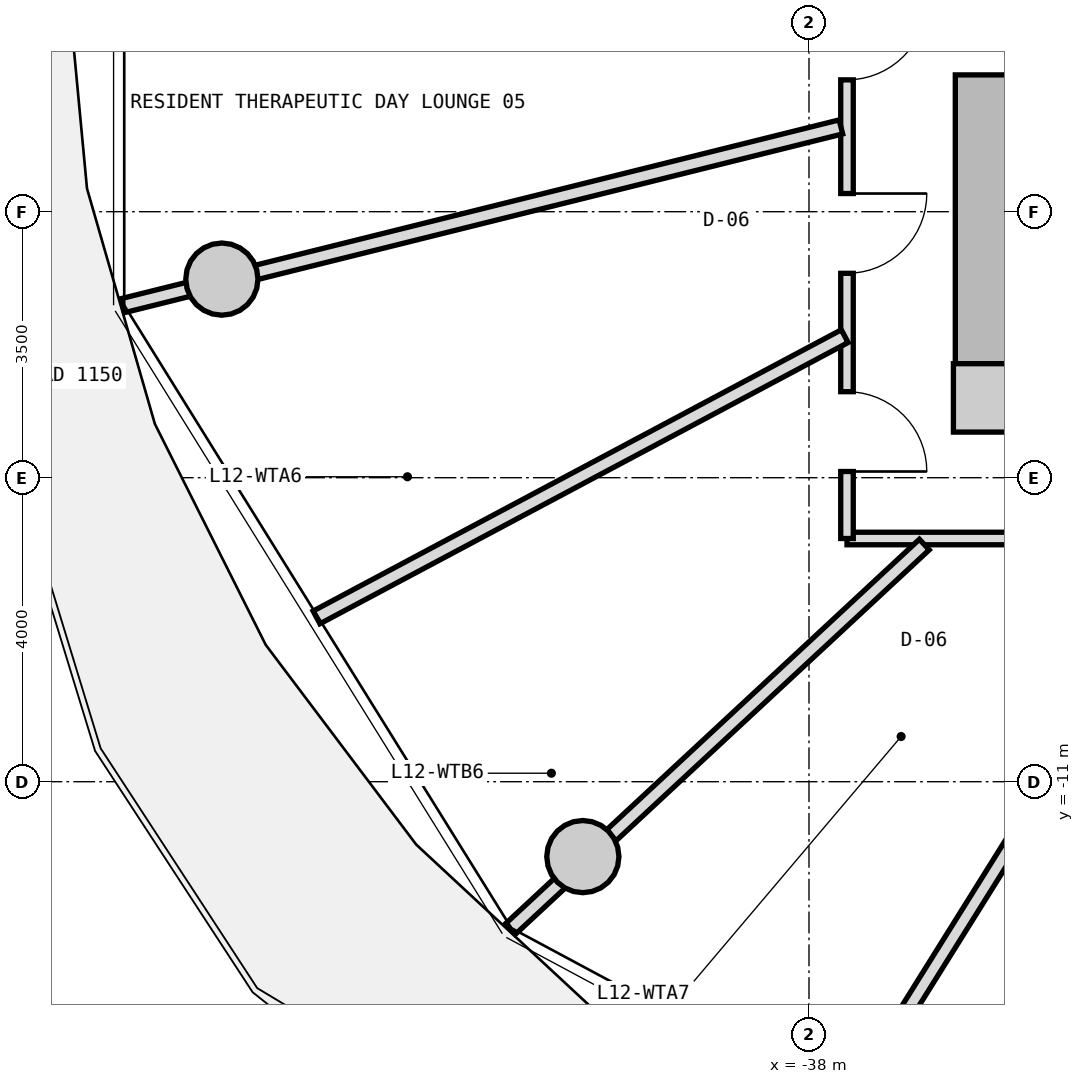
"""IFC4 building model, lengths in metres.
Left out: names, types, materials, properties, quantities, classifications, styles, units other than length and angle.
Written with IfcOpenShell. Run it as: python <this file> out.ifc"""

import sys

from ifc_helpers import new_model, si_unit, direction, frame, frame_2d, origin, origin_2d, place, context, subcontext, project, spatial, rectangle, circle, extrude, source, transform, mapped, element, fill, save


model = new_model("IFC4")
c1 = context("Model", 3, precision=1e-05, world=origin(), true_north=direction((0.0, 1.0)))
c2 = subcontext(c1, "Body", "Model", "MODEL_VIEW")
j1 = project(units=[si_unit("LENGTHUNIT", "METRE"), si_unit("PLANEANGLEUNIT", "RADIAN")], contexts=[c1])
p1 = place(None, origin())
s1 = spatial("IfcSite", under=j1, at=p1, CompositionType="ELEMENT")
p2 = place(p1, origin())
s2 = spatial("IfcBuilding", under=s1, at=p2, CompositionType="ELEMENT")
p3 = place(p2, frame((0.0, 0.0, 42.95)))
s3 = spatial("IfcBuildingStorey", under=s2, at=p3, CompositionType="ELEMENT", Elevation=42.95)
m1 = source(origin(), c2, "Body", "SweptSolid", [
    extrude(rectangle(XDim=0.9, YDim=0.9, at=origin_2d()), origin(), (0.0, 0.0, 1.0), 3.05),
])
p4 = place(p3, frame((-35.65, -5.95, 0.0), z_axis=(0.0, 0.0, 1.0), x_axis=(1.0, 0.0, 0.0)))
e1 = element("IfcColumn", 1, at=p4, inside=s3, PredefinedType="COLUMN", context=c2, shape_type="MappedRepresentation", body=[
    mapped(m1, transform((0.0, 0.0, 0.0), x_axis=(1.0, 0.0, 0.0), y_axis=(0.0, 1.0, 0.0), z_axis=(0.0, 0.0, 1.0), scale=1.0)),
])
m2 = source(origin(), c2, "Body", "SweptSolid", [
    extrude(rectangle(XDim=11.0, YDim=0.85, at=frame_2d((5.5, 0.0))), origin(), (0.0, 0.0, 1.0), 2.79),
])
p5 = place(p3, frame((-35.65, -5.5, 0.0), z_axis=(0.0, 0.0, 1.0), x_axis=(0.0, 1.0, 0.0)))
e2 = element("IfcWall", 2, at=p5, inside=s3, PredefinedType="SHEAR", context=c2, shape_type="MappedRepresentation", body=[
    mapped(m2, transform((0.0, 0.0, 0.0), x_axis=(1.0, 0.0, 0.0), y_axis=(0.0, 1.0, 0.0), z_axis=(0.0, 0.0, 1.0), scale=1.0)),
])
p6 = place(p5, frame((3.8, 0.0, 0.0)))
e3 = element("IfcOpeningElement", 3, at=p6, cuts=e2, PredefinedType="OPENING", context=c2, shape_type="SweptSolid", body=[
    extrude(rectangle(XDim=1.2, YDim=2.15, at=frame_2d((0.6, 1.075))), frame((0.0, 0.435, 0.0), z_axis=(0.0, -1.0, 0.0), x_axis=(1.0, 0.0, 0.0)), (0.0, 0.0, 1.0), 0.87),
])
m3 = source(origin(), c2, "Body", "SweptSolid", [
    extrude(circle(Radius=0.475, at=origin_2d()), origin(), (0.0, 0.0, 1.0), 3.05),
])
for number, where, z_axis, x_axis in (
    (4, (-45.725, -4.387, 0.0), (0.0, 0.0, 1.0), (1.0, 0.0, 0.0)),
    (5, (-40.975, -11.985, 0.0), (0.0, 0.0, 1.0), (1.0, 0.0, 0.0)),
):
    element("IfcColumn", number, at=place(p3, frame(where, z_axis=z_axis, x_axis=x_axis)), inside=s3, PredefinedType="COLUMN", context=c2, shape_type="MappedRepresentation", body=[
        mapped(m3, transform((0.0, 0.0, 0.0), x_axis=(1.0, 0.0, 0.0), y_axis=(0.0, 1.0, 0.0), z_axis=(0.0, 0.0, 1.0), scale=1.0)),
    ])
m4 = source(origin(), c2, "Body", "SweptSolid", [
    extrude(rectangle(XDim=19.0, YDim=0.165, at=frame_2d((9.5, 0.0))), origin(), (0.0, 0.0, 1.0), 2.775),
])
p7 = place(p3, frame((-18.5, -7.8, 0.0), z_axis=(0.0, 0.0, 1.0), x_axis=(-1.0, 0.0, 0.0)))
e6 = element("IfcWall", 6, at=p7, inside=s3, PredefinedType="PARTITIONING", context=c2, shape_type="MappedRepresentation", body=[
    mapped(m4, transform((0.0, 0.0, 0.0), x_axis=(1.0, 0.0, 0.0), y_axis=(0.0, 1.0, 0.0), z_axis=(0.0, 0.0, 1.0), scale=1.0)),
])
p8 = place(p7, frame((15.652, 0.0, 0.0)))
e7 = element("IfcOpeningElement", 7, at=p8, cuts=e6, PredefinedType="OPENING", context=c2, shape_type="SweptSolid", body=[
    extrude(rectangle(XDim=1.05, YDim=2.15, at=frame_2d((0.525, 1.075))), frame((0.0, 0.093, 0.0), z_axis=(0.0, -1.0, 0.0), x_axis=(1.0, 0.0, 0.0)), (0.0, 0.0, 1.0), 0.185),
])
p9 = place(p7, frame((12.5, 0.0, 0.0)))
e8 = element("IfcOpeningElement", 8, at=p9, cuts=e6, PredefinedType="OPENING", context=c2, shape_type="SweptSolid", body=[
    extrude(rectangle(XDim=1.05, YDim=2.15, at=frame_2d((0.525, 1.075))), frame((0.0, 0.093, 0.0), z_axis=(0.0, -1.0, 0.0), x_axis=(1.0, 0.0, 0.0)), (0.0, 0.0, 1.0), 0.185),
])
p10 = place(p7, frame((10.104, 0.0, 0.0)))
e9 = element("IfcOpeningElement", 9, at=p10, cuts=e6, PredefinedType="OPENING", context=c2, shape_type="SweptSolid", body=[
    extrude(rectangle(XDim=1.05, YDim=2.15, at=frame_2d((0.525, 1.075))), frame((0.0, 0.093, 0.0), z_axis=(0.0, -1.0, 0.0), x_axis=(1.0, 0.0, 0.0)), (0.0, 0.0, 1.0), 0.185),
])
p11 = place(p7, frame((7.806, 0.0, 0.0)))
e10 = element("IfcOpeningElement", 10, at=p11, cuts=e6, PredefinedType="OPENING", context=c2, shape_type="SweptSolid", body=[
    extrude(rectangle(XDim=1.05, YDim=2.15, at=frame_2d((0.525, 1.075))), frame((0.0, 0.093, 0.0), z_axis=(0.0, -1.0, 0.0), x_axis=(1.0, 0.0, 0.0)), (0.0, 0.0, 1.0), 0.185),
])
p12 = place(p7, frame((5.915, 0.0, 0.0)))
e11 = element("IfcOpeningElement", 11, at=p12, cuts=e6, PredefinedType="OPENING", context=c2, shape_type="SweptSolid", body=[
    extrude(rectangle(XDim=0.92, YDim=2.1, at=frame_2d((0.46, 1.05))), frame((0.0, 0.093, 0.0), z_axis=(0.0, -1.0, 0.0), x_axis=(1.0, 0.0, 0.0)), (0.0, 0.0, 1.0), 0.185),
])
p13 = place(p7, frame((2.769, 0.0, 0.0)))
e12 = element("IfcOpeningElement", 12, at=p13, cuts=e6, PredefinedType="OPENING", context=c2, shape_type="SweptSolid", body=[
    extrude(rectangle(XDim=0.92, YDim=2.1, at=frame_2d((0.46, 1.05))), frame((0.0, 0.093, 0.0), z_axis=(0.0, -1.0, 0.0), x_axis=(1.0, 0.0, 0.0)), (0.0, 0.0, 1.0), 0.185),
])
m5 = source(origin(), c2, "Body", "SweptSolid", [
    extrude(rectangle(XDim=15.6, YDim=0.165, at=frame_2d((7.8, 0.0))), origin(), (0.0, 0.0, 1.0), 2.775),
])
p14 = place(p3, frame((-37.5, -7.8, 0.0), z_axis=(0.0, 0.0, 1.0), x_axis=(0.0, 1.0, 0.0)))
e13 = element("IfcWall", 13, at=p14, inside=s3, PredefinedType="PARTITIONING", context=c2, shape_type="MappedRepresentation", body=[
    mapped(m5, transform((0.0, 0.0, 0.0), x_axis=(1.0, 0.0, 0.0), y_axis=(0.0, 1.0, 0.0), z_axis=(0.0, 0.0, 1.0), scale=1.0)),
])
p15 = place(p14, frame((13.293, 0.0, 0.0)))
e14 = element("IfcOpeningElement", 14, at=p15, cuts=e13, PredefinedType="OPENING", context=c2, shape_type="SweptSolid", body=[
    extrude(rectangle(XDim=1.05, YDim=2.15, at=frame_2d((0.525, 1.075))), frame((0.0, 0.093, 0.0), z_axis=(0.0, -1.0, 0.0), x_axis=(1.0, 0.0, 0.0)), (0.0, 0.0, 1.0), 0.185),
])
p16 = place(p14, frame((11.018, 0.0, 0.0)))
e15 = element("IfcOpeningElement", 15, at=p16, cuts=e13, PredefinedType="OPENING", context=c2, shape_type="SweptSolid", body=[
    extrude(rectangle(XDim=1.05, YDim=2.15, at=frame_2d((0.525, 1.075))), frame((0.0, 0.093, 0.0), z_axis=(0.0, -1.0, 0.0), x_axis=(1.0, 0.0, 0.0)), (0.0, 0.0, 1.0), 0.185),
])
p17 = place(p14, frame((7.812, 0.0, 0.0)))
e16 = element("IfcOpeningElement", 16, at=p17, cuts=e13, PredefinedType="OPENING", context=c2, shape_type="SweptSolid", body=[
    extrude(rectangle(XDim=1.05, YDim=2.15, at=frame_2d((0.525, 1.075))), frame((0.0, 0.093, 0.0), z_axis=(0.0, -1.0, 0.0), x_axis=(1.0, 0.0, 0.0)), (0.0, 0.0, 1.0), 0.185),
])
p18 = place(p14, frame((6.035, 0.0, 0.0)))
e17 = element("IfcOpeningElement", 17, at=p18, cuts=e13, PredefinedType="OPENING", context=c2, shape_type="SweptSolid", body=[
    extrude(rectangle(XDim=1.05, YDim=2.15, at=frame_2d((0.525, 1.075))), frame((0.0, 0.093, 0.0), z_axis=(0.0, -1.0, 0.0), x_axis=(1.0, 0.0, 0.0)), (0.0, 0.0, 1.0), 0.185),
])
p19 = place(p14, frame((3.489, 0.0, 0.0)))
e18 = element("IfcOpeningElement", 18, at=p19, cuts=e13, PredefinedType="OPENING", context=c2, shape_type="SweptSolid", body=[
    extrude(rectangle(XDim=1.05, YDim=2.15, at=frame_2d((0.525, 1.075))), frame((0.0, 0.093, 0.0), z_axis=(0.0, -1.0, 0.0), x_axis=(1.0, 0.0, 0.0)), (0.0, 0.0, 1.0), 0.185),
])
p20 = place(p14, frame((0.882, 0.0, 0.0)))
e19 = element("IfcOpeningElement", 19, at=p20, cuts=e13, PredefinedType="OPENING", context=c2, shape_type="SweptSolid", body=[
    extrude(rectangle(XDim=1.05, YDim=2.15, at=frame_2d((0.525, 1.075))), frame((0.0, 0.093, 0.0), z_axis=(0.0, -1.0, 0.0), x_axis=(1.0, 0.0, 0.0)), (0.0, 0.0, 1.0), 0.185),
])
m6 = source(origin(), c2, "Body", "SweptSolid", [
    extrude(rectangle(XDim=9.737, YDim=0.19, at=frame_2d((4.869, 0.0))), origin(), (0.0, 0.0, 1.0), 2.225),
])
p21 = place(p3, frame((-37.58, -2.385, 0.0), z_axis=(0.0, 0.0, 1.0), x_axis=(-0.970392716238, -0.241532557375, 0.0)))
e20 = element("IfcWall", 20, at=p21, inside=s3, PredefinedType="PARTITIONING", context=c2, shape_type="MappedRepresentation", body=[
    mapped(m6, transform((0.0, 0.0, 0.0), x_axis=(1.0, 0.0, 0.0), y_axis=(0.0, 1.0, 0.0), z_axis=(0.0, 0.0, 1.0), scale=1.0)),
])
m7 = source(origin(), c2, "Body", "SweptSolid", [
    extrude(rectangle(XDim=7.435, YDim=0.19, at=frame_2d((3.717, 0.0))), origin(), (0.0, 0.0, 1.0), 2.415),
])
p22 = place(p3, frame((-36.483, -7.88, 0.0), z_axis=(0.0, 0.0, 1.0), x_axis=(-0.732651956848, -0.680603489652, 0.0)))
e21 = element("IfcWall", 21, at=p22, inside=s3, PredefinedType="PARTITIONING", context=c2, shape_type="MappedRepresentation", body=[
    mapped(m7, transform((0.0, 0.0, 0.0), x_axis=(1.0, 0.0, 0.0), y_axis=(0.0, 1.0, 0.0), z_axis=(0.0, 0.0, 1.0), scale=1.0)),
])
m8 = source(origin(), c2, "Body", "SweptSolid", [
    extrude(rectangle(XDim=7.873, YDim=0.19, at=frame_2d((3.937, 0.0))), origin(), (0.0, 0.0, 1.0), 2.775),
])
p23 = place(p3, frame((-37.53, -5.138, 0.0), z_axis=(0.0, 0.0, 1.0), x_axis=(-0.882666052726, -0.470000680175, 0.0)))
e22 = element("IfcWall", 22, at=p23, inside=s3, PredefinedType="PARTITIONING", context=c2, shape_type="MappedRepresentation", body=[
    mapped(m8, transform((0.0, 0.0, 0.0), x_axis=(1.0, 0.0, 0.0), y_axis=(0.0, 1.0, 0.0), z_axis=(0.0, 0.0, 1.0), scale=1.0)),
])
m9 = source(origin(), c2, "Body", "SweptSolid", [
    extrude(rectangle(XDim=8.818, YDim=0.19, at=frame_2d((4.409, 0.0))), origin(), (0.0, 0.0, 1.0), 2.775),
])
p24 = place(p3, frame((-32.841, -7.83, 0.0), z_axis=(0.0, 0.0, 1.0), x_axis=(-0.529931746109, -0.848040296487, 0.0)))
e23 = element("IfcWall", 23, at=p24, inside=s3, PredefinedType="PARTITIONING", context=c2, shape_type="MappedRepresentation", body=[
    mapped(m9, transform((0.0, 0.0, 0.0), x_axis=(1.0, 0.0, 0.0), y_axis=(0.0, 1.0, 0.0), z_axis=(0.0, 0.0, 1.0), scale=1.0)),
])
m10 = source(origin(), c2, "Body", "SweptSolid", [
    extrude(rectangle(XDim=1.2, YDim=2.15, at=frame_2d((0.6, 1.075))), frame((0.0, 0.025, 0.0), z_axis=(0.0, -1.0, 0.0), x_axis=(1.0, 0.0, 0.0)), (0.0, 0.0, 1.0), 0.05),
])
p25 = place(p6, frame((1.2, 0.0, 0.0), z_axis=(0.0, 0.0, 1.0), x_axis=(-1.0, 0.0, 0.0)))
e24 = element("IfcDoor", 24, at=p25, inside=s3, OperationType="SINGLE_SWING_LEFT", PredefinedType="DOOR", context=c2, shape_type="MappedRepresentation", body=[
    mapped(m10, transform((0.0, 0.0, 0.0), x_axis=(1.0, 0.0, 0.0), y_axis=(0.0, 1.0, 0.0), z_axis=(0.0, 0.0, 1.0), scale=1.0)),
])
fill(e3, e24)
m11 = source(origin(), c2, "Body", "SweptSolid", [
    extrude(rectangle(XDim=1.05, YDim=2.15, at=frame_2d((0.525, 1.075))), frame((0.0, 0.025, 0.0), z_axis=(0.0, -1.0, 0.0), x_axis=(1.0, 0.0, 0.0)), (0.0, 0.0, 1.0), 0.05),
])
p26 = place(p18, frame((1.05, 0.0, 0.0), z_axis=(0.0, 0.0, 1.0), x_axis=(-1.0, 0.0, 0.0)))
e25 = element("IfcDoor", 25, at=p26, inside=s3, OperationType="SINGLE_SWING_LEFT", PredefinedType="DOOR", context=c2, shape_type="MappedRepresentation", body=[
    mapped(m11, transform((0.0, 0.0, 0.0), x_axis=(1.0, 0.0, 0.0), y_axis=(0.0, 1.0, 0.0), z_axis=(0.0, 0.0, 1.0), scale=1.0)),
])
fill(e17, e25)
p27 = place(p19, frame((1.05, 0.0, 0.0), z_axis=(0.0, 0.0, 1.0), x_axis=(-1.0, 0.0, 0.0)))
e26 = element("IfcDoor", 26, at=p27, inside=s3, OperationType="SINGLE_SWING_LEFT", PredefinedType="DOOR", context=c2, shape_type="MappedRepresentation", body=[
    mapped(m11, transform((0.0, 0.0, 0.0), x_axis=(1.0, 0.0, 0.0), y_axis=(0.0, 1.0, 0.0), z_axis=(0.0, 0.0, 1.0), scale=1.0)),
])
fill(e18, e26)
p28 = place(p20, frame((1.05, 0.0, 0.0), z_axis=(0.0, 0.0, 1.0), x_axis=(-1.0, 0.0, 0.0)))
e27 = element("IfcDoor", 27, at=p28, inside=s3, OperationType="SINGLE_SWING_RIGHT", PredefinedType="DOOR", context=c2, shape_type="MappedRepresentation", body=[
    mapped(m11, transform((0.0, 0.0, 0.0), x_axis=(1.0, 0.0, 0.0), y_axis=(0.0, 1.0, 0.0), z_axis=(0.0, 0.0, 1.0), scale=1.0)),
])
fill(e19, e27)
save(model, sys.argv[1])
